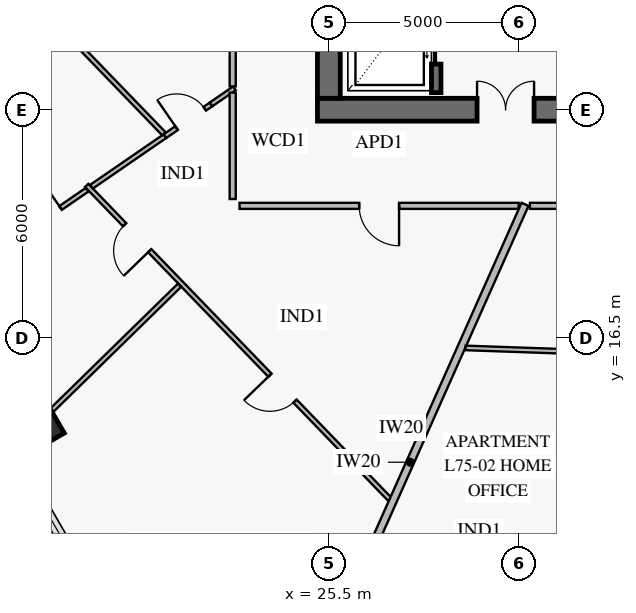
"""IFC4 building model, lengths in metres.
Left out: names, types, materials, properties, quantities, classifications, styles, units other than length and angle.
Written with IfcOpenShell. Run it as: python <this file> out.ifc"""

import sys

from ifc_helpers import new_model, si_unit, direction, frame, frame_2d, origin, origin_2d, place, context, subcontext, project, spatial, rectangle, extrude, element, fill, save


model = new_model("IFC4")
c1 = context("Model", 3, precision=1e-05, world=origin(), true_north=direction((0.0, 1.0)))
c2 = subcontext(c1, "Body", "Model", "MODEL_VIEW")
j1 = project(units=[si_unit("LENGTHUNIT", "METRE"), si_unit("PLANEANGLEUNIT", "RADIAN")], contexts=[c1])
p1 = place(None, origin())
s1 = spatial("IfcSite", under=j1, at=p1, CompositionType="ELEMENT")
p2 = place(p1, origin())
s2 = spatial("IfcBuilding", under=s1, at=p2, CompositionType="ELEMENT")
p3 = place(p2, frame((0.0, 0.0, 295.8)))
s3 = spatial("IfcBuildingStorey", under=s2, at=p3, CompositionType="ELEMENT", Elevation=295.8)
p4 = place(p3, frame((25.2, 22.5, 0.0), z_axis=(0.0, 0.0, 1.0), x_axis=(1.0, 0.0, 0.0)))
e1 = element("IfcWall", 1, at=p4, inside=s3, PredefinedType="SHEAR", context=c2, shape_type="SweptSolid", body=[
    extrude(rectangle(XDim=9.85, YDim=0.6, at=frame_2d((4.925, 0.0))), origin(), (0.0, 0.0, 1.0), 3.8),
])
p5 = place(p4, frame((4.2, 0.0, 0.0)))
e2 = element("IfcOpeningElement", 2, at=p5, cuts=e1, PredefinedType="OPENING", context=c2, shape_type="SweptSolid", body=[
    extrude(rectangle(XDim=1.5, YDim=2.15, at=frame_2d((0.75, 1.075))), frame((0.0, 0.312, 0.0), z_axis=(0.0, -1.0, 0.0), x_axis=(1.0, 0.0, 0.0)), (0.0, 0.0, 1.0), 0.624),
])
p6 = place(p3, frame((25.5, 22.8, 0.0), z_axis=(0.0, 0.0, 1.0), x_axis=(0.0, 1.0, 0.0)))
e3 = element("IfcWall", 3, at=p6, inside=s3, PredefinedType="SHEAR", context=c2, shape_type="SweptSolid", body=[
    extrude(rectangle(XDim=18.4, YDim=0.6, at=frame_2d((9.2, 0.0))), origin(), (0.0, 0.0, 1.0), 3.8),
])
p7 = place(p6, frame((8.95, 0.0, 0.0)))
e4 = element("IfcOpeningElement", 4, at=p7, cuts=e3, PredefinedType="OPENING", context=c2, shape_type="SweptSolid", body=[
    extrude(rectangle(XDim=1.1, YDim=2.15, at=frame_2d((0.55, 1.075))), frame((0.0, 0.312, 0.0), z_axis=(0.0, -1.0, 0.0), x_axis=(1.0, 0.0, 0.0)), (0.0, 0.0, 1.0), 0.624),
])
p8 = place(p3, frame((17.956, 14.145, 0.0), z_axis=(0.0, 0.0, 1.0), x_axis=(0.5, -0.866025403784, 0.0)))
e5 = element("IfcColumn", 5, at=p8, inside=s3, PredefinedType="COLUMN", context=c2, shape_type="SweptSolid", body=[
    extrude(rectangle(XDim=0.85, YDim=0.85, at=origin_2d()), origin(), (0.0, 0.0, 1.0), 3.55),
])
p9 = place(p3, frame((28.325, 22.95, 0.0), z_axis=(0.0, 0.0, 1.0), x_axis=(0.0, 1.0, 0.0)))
e6 = element("IfcWall", 6, at=p9, inside=s3, PredefinedType="SOLIDWALL", context=c2, shape_type="SweptSolid", body=[
    extrude(rectangle(XDim=8.2, YDim=0.25, at=frame_2d((4.1, 0.0))), origin(), (0.0, 0.0, 1.0), 3.8),
])
p10 = place(p9, frame((0.75, 0.0, 0.0)))
e7 = element("IfcOpeningElement", 7, at=p10, cuts=e6, PredefinedType="OPENING", context=c2, shape_type="SweptSolid", body=[
    extrude(rectangle(XDim=1.3, YDim=2.3, at=frame_2d((0.65, 1.15))), frame((0.0, 0.137, 0.0), z_axis=(0.0, -1.0, 0.0), x_axis=(1.0, 0.0, 0.0)), (0.0, 0.0, 1.0), 0.274),
])
p11 = place(p9, frame((3.78, 0.0, 0.0)))
e8 = element("IfcOpeningElement", 8, at=p11, cuts=e6, PredefinedType="OPENING", context=c2, shape_type="SweptSolid", body=[
    extrude(rectangle(XDim=0.9, YDim=2.1, at=frame_2d((0.45, 1.05))), frame((0.0, 0.137, 0.0), z_axis=(0.0, -1.0, 0.0), x_axis=(1.0, 0.0, 0.0)), (0.0, 0.0, 1.0), 0.274),
])
p12 = place(p9, frame((6.5, 0.0, 0.0)))
e9 = element("IfcOpeningElement", 9, at=p12, cuts=e6, PredefinedType="OPENING", context=c2, shape_type="SweptSolid", body=[
    extrude(rectangle(XDim=0.9, YDim=2.1, at=frame_2d((0.45, 1.05))), frame((0.0, 0.137, 0.0), z_axis=(0.0, -1.0, 0.0), x_axis=(1.0, 0.0, 0.0)), (0.0, 0.0, 1.0), 0.274),
])
p13 = place(p3, frame((19.127, 20.508, 0.0), z_axis=(0.0, 0.0, 1.0), x_axis=(0.694661267459, -0.719337002727, 0.0)))
e10 = element("IfcWall", 10, at=p13, inside=s3, PredefinedType="PARTITIONING", context=c2, shape_type="SweptSolid", body=[
    extrude(rectangle(XDim=11.487, YDim=0.12, at=frame_2d((5.743, 0.0))), origin(), (0.0, 0.0, 1.0), 2.95),
])
p14 = place(p13, frame((1.438, 0.0, 0.0)))
e11 = element("IfcOpeningElement", 11, at=p14, cuts=e10, PredefinedType="OPENING", context=c2, shape_type="SweptSolid", body=[
    extrude(rectangle(XDim=0.95, YDim=2.1, at=frame_2d((0.475, 1.05))), frame((0.0, 0.072, 0.0), z_axis=(0.0, -1.0, 0.0), x_axis=(1.0, 0.0, 0.0)), (0.0, 0.0, 1.0), 0.144),
])
p15 = place(p13, frame((6.942, 0.0, 0.0)))
e12 = element("IfcOpeningElement", 12, at=p15, cuts=e10, PredefinedType="OPENING", context=c2, shape_type="SweptSolid", body=[
    extrude(rectangle(XDim=0.95, YDim=2.1, at=frame_2d((0.475, 1.05))), frame((0.0, 0.072, 0.0), z_axis=(0.0, -1.0, 0.0), x_axis=(1.0, 0.0, 0.0)), (0.0, 0.0, 1.0), 0.144),
])
p16 = place(p3, frame((22.4, 22.639, 0.0), z_axis=(0.0, 0.0, 1.0), x_axis=(-0.82372765271, -0.566985673683, 0.0)))
e13 = element("IfcWall", 13, at=p16, inside=s3, PredefinedType="PARTITIONING", context=c2, shape_type="SweptSolid", body=[
    extrude(rectangle(XDim=1.474, YDim=0.12, at=frame_2d((0.737, 0.0))), origin(), (0.0, 0.0, 1.0), 3.55),
])
p17 = place(p16, frame((0.2, 0.0, 0.0)))
e14 = element("IfcOpeningElement", 14, at=p17, cuts=e13, PredefinedType="OPENING", context=c2, shape_type="SweptSolid", body=[
    extrude(rectangle(XDim=0.9, YDim=2.1, at=frame_2d((0.45, 1.05))), frame((0.0, 0.072, 0.0), z_axis=(0.0, -1.0, 0.0), x_axis=(1.0, 0.0, 0.0)), (0.0, 0.0, 1.0), 0.144),
])
p18 = place(p3, frame((21.186, 21.803, 0.0), z_axis=(0.0, 0.0, 1.0), x_axis=(-0.823756191061, -0.566944210384, 0.0)))
e15 = element("IfcWall", 15, at=p18, inside=s3, PredefinedType="PARTITIONING", context=c2, shape_type="SweptSolid", body=[
    extrude(rectangle(XDim=2.344, YDim=0.12, at=frame_2d((1.172, 0.0))), origin(), (0.0, 0.0, 1.0), 3.15),
])
p19 = place(p3, frame((19.141, 20.396, 0.0), z_axis=(0.0, 0.0, 1.0), x_axis=(-0.823725661839, -0.566988566047, 0.0)))
e16 = element("IfcWall", 16, at=p19, inside=s3, PredefinedType="PARTITIONING", context=c2, shape_type="SweptSolid", body=[
    extrude(rectangle(XDim=5.183, YDim=0.12, at=frame_2d((2.591, 0.0))), origin(), (0.0, 0.0, 1.0), 2.93),
])
p20 = place(p19, frame((0.85, 0.0, 0.0)))
e17 = element("IfcOpeningElement", 17, at=p20, cuts=e16, PredefinedType="OPENING", context=c2, shape_type="SweptSolid", body=[
    extrude(rectangle(XDim=0.95, YDim=2.1, at=frame_2d((0.475, 1.05))), frame((0.0, 0.072, 0.0), z_axis=(0.0, -1.0, 0.0), x_axis=(1.0, 0.0, 0.0)), (0.0, 0.0, 1.0), 0.144),
])
p21 = place(p3, frame((23.15, 19.97, 0.0), z_axis=(0.0, 0.0, 1.0), x_axis=(1.0, 0.0, 0.0)))
e18 = element("IfcWall", 18, at=p21, inside=s3, PredefinedType="PARTITIONING", context=c2, shape_type="SweptSolid", body=[
    extrude(rectangle(XDim=7.346, YDim=0.16, at=frame_2d((3.673, 0.0))), origin(), (0.0, 0.0, 1.0), 2.95),
])
p22 = place(p21, frame((3.148, 0.0, 0.0)))
e19 = element("IfcOpeningElement", 19, at=p22, cuts=e18, PredefinedType="OPENING", context=c2, shape_type="SweptSolid", body=[
    extrude(rectangle(XDim=1.05, YDim=2.15, at=frame_2d((0.525, 1.075))), frame((0.0, 0.092, 0.0), z_axis=(0.0, -1.0, 0.0), x_axis=(1.0, 0.0, 0.0)), (0.0, 0.0, 1.0), 0.184),
])
p23 = place(p3, frame((23.01, 26.752, 0.0), z_axis=(0.0, 0.0, 1.0), x_axis=(-0.927183134291, -0.374608376155, 0.0)))
e20 = element("IfcWall", 20, at=p23, inside=s3, PredefinedType="PARTITIONING", context=c2, shape_type="SweptSolid", body=[
    extrude(rectangle(XDim=11.805, YDim=0.2, at=frame_2d((5.902, 0.0))), origin(), (0.0, 0.0, 1.0), 2.93),
])
p24 = place(p3, frame((21.571, 17.88, 0.0), z_axis=(0.0, 0.0, 1.0), x_axis=(-0.714721208256, -0.699409461238, 0.0)))
e21 = element("IfcWall", 21, at=p24, inside=s3, PredefinedType="PARTITIONING", context=c2, shape_type="SweptSolid", body=[
    extrude(rectangle(XDim=4.704, YDim=0.12, at=frame_2d((2.352, 0.0))), origin(), (0.0, 0.0, 1.0), 2.95),
])
p25 = place(p3, frame((23.015, 23.062, 0.0), z_axis=(0.0, 0.0, 1.0), x_axis=(-0.823707844143, -0.567014450871, 0.0)))
e22 = element("IfcWall", 22, at=p25, inside=s3, PredefinedType="PARTITIONING", context=c2, shape_type="SweptSolid", body=[
    extrude(rectangle(XDim=0.747, YDim=0.12, at=frame_2d((0.373, 0.0))), origin(), (0.0, 0.0, 1.0), 3.55),
])
p26 = place(p3, frame((18.366, 24.759, 0.0), z_axis=(0.0, 0.0, 1.0), x_axis=(0.694640032454, -0.719357508692, 0.0)))
e23 = element("IfcWall", 23, at=p26, inside=s3, PredefinedType="PARTITIONING", context=c2, shape_type="SweptSolid", body=[
    extrude(rectangle(XDim=4.02, YDim=0.12, at=frame_2d((2.01, 0.0))), origin(), (0.0, 0.0, 1.0), 3.15),
])
p27 = place(p3, frame((30.662, 20.01, 0.0), z_axis=(0.0, 0.0, 1.0), x_axis=(-0.406725337387, -0.913550491176, 0.0)))
e24 = element("IfcWall", 24, at=p27, inside=s3, PredefinedType="PARTITIONING", context=c2, shape_type="SweptSolid", body=[
    extrude(rectangle(XDim=14.858, YDim=0.2, at=frame_2d((7.429, 0.0))), origin(), (0.0, 0.0, 1.0), 2.93),
])
p28 = place(p3, frame((29.098, 16.231, 0.0), z_axis=(0.0, 0.0, 1.0), x_axis=(0.999392117738, -0.034862515735, 0.0)))
e25 = element("IfcWall", 25, at=p28, inside=s3, PredefinedType="PARTITIONING", context=c2, shape_type="SweptSolid", body=[
    extrude(rectangle(XDim=4.349, YDim=0.12, at=frame_2d((2.174, 0.0))), origin(), (0.0, 0.0, 1.0), 2.95),
])
p29 = place(p3, frame((22.97, 22.949, 0.0), z_axis=(0.0, 0.0, 1.0), x_axis=(0.0, -1.0, 0.0)))
e26 = element("IfcWall", 26, at=p29, inside=s3, PredefinedType="PARTITIONING", context=c2, shape_type="SweptSolid", body=[
    extrude(rectangle(XDim=2.799, YDim=0.16, at=frame_2d((1.399, 0.0))), origin(), (0.0, 0.0, 1.0), 3.55),
])
p30 = place(p3, frame((22.97, 26.581, 0.0), z_axis=(0.0, 0.0, 1.0), x_axis=(0.0, -1.0, 0.0)))
e27 = element("IfcWall", 27, at=p30, inside=s3, PredefinedType="PARTITIONING", context=c2, shape_type="SweptSolid", body=[
    extrude(rectangle(XDim=3.467, YDim=0.16, at=frame_2d((1.733, 0.0))), origin(), (0.0, 0.0, 1.0), 3.55),
])
p31 = place(p3, frame((30.791, 19.97, 0.0), z_axis=(0.0, 0.0, 1.0), x_axis=(1.0, 0.0, 0.0)))
e28 = element("IfcWall", 28, at=p31, inside=s3, PredefinedType="PARTITIONING", context=c2, shape_type="SweptSolid", body=[
    extrude(rectangle(XDim=3.26, YDim=0.16, at=frame_2d((1.63, 0.0))), origin(), (0.0, 0.0, 1.0), 2.95),
])
p32 = place(p5, origin())
e29 = element("IfcDoor", 29, at=p32, inside=s3, OperationType="DOUBLE_DOOR_SINGLE_SWING", PredefinedType="DOOR", context=c2, shape_type="SweptSolid", body=[
    extrude(rectangle(XDim=1.5, YDim=2.15, at=frame_2d((0.75, 1.075))), frame((0.0, 0.025, 0.0), z_axis=(0.0, -1.0, 0.0), x_axis=(1.0, 0.0, 0.0)), (0.0, 0.0, 1.0), 0.05),
])
fill(e2, e29)
p33 = place(p10, frame((1.3, 0.0, 0.0), z_axis=(0.0, 0.0, 1.0), x_axis=(-1.0, 0.0, 0.0)))
e30 = element("IfcDoor", 30, at=p33, inside=s3, OperationType="DOUBLE_DOOR_SLIDING", PredefinedType="DOOR", context=c2, shape_type="SweptSolid", body=[
    extrude(rectangle(XDim=1.3, YDim=2.3, at=frame_2d((0.65, 1.15))), frame((0.0, 0.025, 0.0), z_axis=(0.0, -1.0, 0.0), x_axis=(1.0, 0.0, 0.0)), (0.0, 0.0, 1.0), 0.05),
])
fill(e7, e30)
p34 = place(p14, frame((0.95, 0.0, 0.0), z_axis=(0.0, 0.0, 1.0), x_axis=(-1.0, 0.0, 0.0)))
e31 = element("IfcDoor", 31, at=p34, inside=s3, OperationType="SINGLE_SWING_LEFT", PredefinedType="DOOR", context=c2, shape_type="SweptSolid", body=[
    extrude(rectangle(XDim=0.95, YDim=2.1, at=frame_2d((0.475, 1.05))), frame((0.0, 0.025, 0.0), z_axis=(0.0, -1.0, 0.0), x_axis=(1.0, 0.0, 0.0)), (0.0, 0.0, 1.0), 0.05),
])
fill(e11, e31)
p35 = place(p15, frame((0.95, 0.0, 0.0), z_axis=(0.0, 0.0, 1.0), x_axis=(-1.0, 0.0, 0.0)))
e32 = element("IfcDoor", 32, at=p35, inside=s3, OperationType="SINGLE_SWING_RIGHT", PredefinedType="DOOR", context=c2, shape_type="SweptSolid", body=[
    extrude(rectangle(XDim=0.95, YDim=2.1, at=frame_2d((0.475, 1.05))), frame((0.0, 0.025, 0.0), z_axis=(0.0, -1.0, 0.0), x_axis=(1.0, 0.0, 0.0)), (0.0, 0.0, 1.0), 0.05),
])
fill(e12, e32)
p36 = place(p17, frame((0.9, 0.0, 0.0), z_axis=(0.0, 0.0, 1.0), x_axis=(-1.0, 0.0, 0.0)))
e33 = element("IfcDoor", 33, at=p36, inside=s3, OperationType="SINGLE_SWING_LEFT", PredefinedType="DOOR", context=c2, shape_type="SweptSolid", body=[
    extrude(rectangle(XDim=0.9, YDim=2.1, at=frame_2d((0.45, 1.05))), frame((0.0, 0.025, 0.0), z_axis=(0.0, -1.0, 0.0), x_axis=(1.0, 0.0, 0.0)), (0.0, 0.0, 1.0), 0.05),
])
fill(e14, e33)
p37 = place(p20, frame((0.95, 0.0, 0.0), z_axis=(0.0, 0.0, 1.0), x_axis=(-1.0, 0.0, 0.0)))
e34 = element("IfcDoor", 34, at=p37, inside=s3, OperationType="SINGLE_SWING_RIGHT", PredefinedType="DOOR", context=c2, shape_type="SweptSolid", body=[
    extrude(rectangle(XDim=0.95, YDim=2.1, at=frame_2d((0.475, 1.05))), frame((0.0, 0.025, 0.0), z_axis=(0.0, -1.0, 0.0), x_axis=(1.0, 0.0, 0.0)), (0.0, 0.0, 1.0), 0.05),
])
fill(e17, e34)
p38 = place(p22, frame((1.05, 0.0, 0.0), z_axis=(0.0, 0.0, 1.0), x_axis=(-1.0, 0.0, 0.0)))
e35 = element("IfcDoor", 35, at=p38, inside=s3, OperationType="SINGLE_SWING_LEFT", PredefinedType="DOOR", context=c2, shape_type="SweptSolid", body=[
    extrude(rectangle(XDim=1.05, YDim=2.15, at=frame_2d((0.525, 1.075))), frame((0.0, 0.025, 0.0), z_axis=(0.0, -1.0, 0.0), x_axis=(1.0, 0.0, 0.0)), (0.0, 0.0, 1.0), 0.05),
])
fill(e19, e35)
save(model, sys.argv[1])
